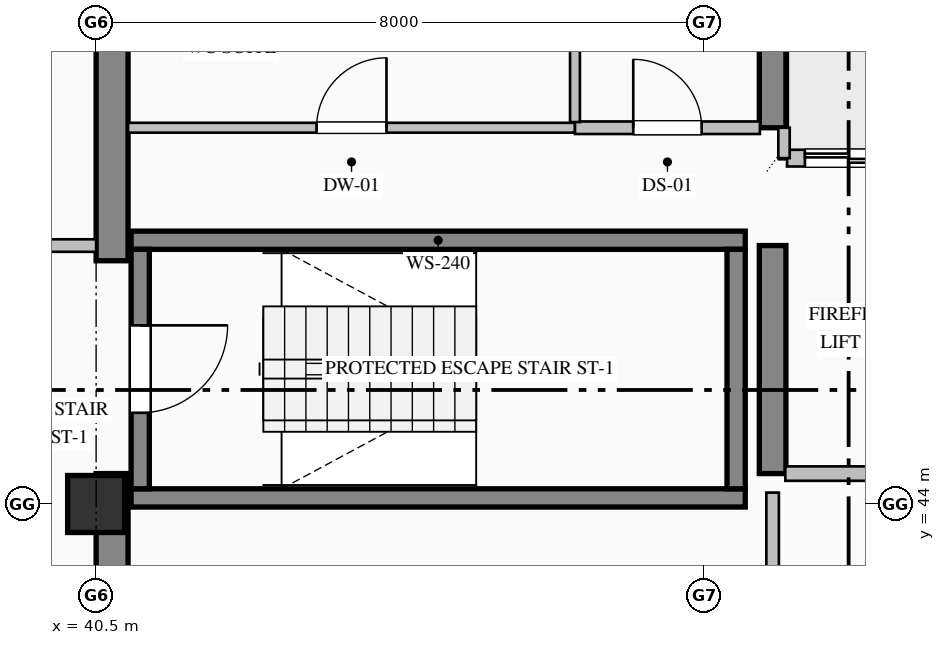
"""IFC4 building model, lengths in metres.
Left out: names, types, materials, properties, quantities, classifications, styles, units other than length and angle.
Written with IfcOpenShell. Run it as: python <this file> out.ifc"""

import sys

from ifc_helpers import new_model, si_unit, direction, frame, frame_2d, origin, origin_2d, place, context, subcontext, project, spatial, rectangle, extrude, element, fill, save


model = new_model("IFC4")
c1 = context("Model", 3, precision=1e-05, world=origin(), true_north=direction((0.0, 1.0)))
c2 = subcontext(c1, "Body", "Model", "MODEL_VIEW")
j1 = project(units=[si_unit("LENGTHUNIT", "METRE"), si_unit("PLANEANGLEUNIT", "RADIAN")], contexts=[c1])
p1 = place(None, origin())
s1 = spatial("IfcSite", under=j1, at=p1, CompositionType="ELEMENT")
p2 = place(p1, origin())
s2 = spatial("IfcBuilding", under=s1, at=p2, CompositionType="ELEMENT")
p3 = place(p2, frame((0.0, 0.0, 291.2)))
s3 = spatial("IfcBuildingStorey", under=s2, at=p3, CompositionType="ELEMENT", Elevation=291.2)
p4 = place(p3, frame((40.71, 36.42, 0.0), z_axis=(0.0, 0.0, 1.0), x_axis=(0.0, 1.0, 0.0)))
e1 = element("IfcWall", 1, at=p4, inside=s3, PredefinedType="SHEAR", context=c2, shape_type="SweptSolid", body=[
    extrude(rectangle(XDim=7.98, YDim=0.42, at=frame_2d((3.99, 0.0))), origin(), (0.0, 0.0, 1.0), 3.785),
])
p5 = place(p3, frame((40.71, 47.2, 0.0), z_axis=(0.0, 0.0, 1.0), x_axis=(0.0, 1.0, 0.0)))
e2 = element("IfcWall", 2, at=p5, inside=s3, PredefinedType="SHEAR", context=c2, shape_type="SweptSolid", body=[
    extrude(rectangle(XDim=4.38, YDim=0.42, at=frame_2d((2.19, 0.0))), origin(), (0.0, 0.0, 1.0), 3.785),
])
p6 = place(p3, frame((49.4, 44.4, 0.0), z_axis=(0.0, 0.0, 1.0), x_axis=(0.0, 1.0, 0.0)))
e3 = element("IfcWall", 3, at=p6, inside=s3, PredefinedType="SHEAR", context=c2, shape_type="SweptSolid", body=[
    extrude(rectangle(XDim=3.0, YDim=0.35, at=frame_2d((1.5, 0.0))), origin(), (0.0, 0.0, 1.0), 3.785),
])
p7 = place(p3, frame((49.4, 48.95, 0.0), z_axis=(0.0, 0.0, 1.0), x_axis=(0.0, 1.0, 0.0)))
e4 = element("IfcWall", 4, at=p7, inside=s3, PredefinedType="SHEAR", context=c2, shape_type="SweptSolid", body=[
    extrude(rectangle(XDim=2.63, YDim=0.35, at=frame_2d((1.315, 0.0))), origin(), (0.0, 0.0, 1.0), 3.785),
])
p8 = place(p3, frame((40.5, 44.0, 0.0), z_axis=(0.0, 0.0, 1.0), x_axis=(1.0, 0.0, 0.0)))
e5 = element("IfcColumn", 5, at=p8, inside=s3, PredefinedType="COLUMN", context=c2, shape_type="SweptSolid", body=[
    extrude(rectangle(XDim=0.75, YDim=0.75, at=origin_2d()), origin(), (0.0, 0.0, 1.0), 4.0),
])
for number, where, z_axis, x_axis in (
    (6, (40.96, 47.47, 0.0), (0.0, 0.0, 1.0), (1.0, 0.0, 0.0)),
    (7, (49.04, 44.08, 0.0), (0.0, 0.0, 1.0), (-1.0, 0.0, 0.0)),
):
    element("IfcWall", number, at=place(p3, frame(where, z_axis=z_axis, x_axis=x_axis)), inside=s3, PredefinedType="SOLIDWALL", context=c2, shape_type="SweptSolid", body=[
        extrude(rectangle(XDim=8.08, YDim=0.24, at=frame_2d((4.04, 0.0))), origin(), (0.0, 0.0, 1.0), 4.0),
    ])
p9 = place(p3, frame((41.08, 47.35, 0.0), z_axis=(0.0, 0.0, 1.0), x_axis=(0.0, -1.0, 0.0)))
e8 = element("IfcWall", 8, at=p9, inside=s3, PredefinedType="SOLIDWALL", context=c2, shape_type="SweptSolid", body=[
    extrude(rectangle(XDim=3.15, YDim=0.24, at=frame_2d((1.575, 0.0))), origin(), (0.0, 0.0, 1.0), 4.0),
])
p10 = place(p9, frame((1.0, 0.0, 0.0)))
e9 = element("IfcOpeningElement", 9, at=p10, cuts=e8, PredefinedType="OPENING", context=c2, shape_type="SweptSolid", body=[
    extrude(rectangle(XDim=1.15, YDim=2.2, at=frame_2d((0.575, 1.1))), frame((0.0, 0.13, 0.0), z_axis=(0.0, -1.0, 0.0), x_axis=(1.0, 0.0, 0.0)), (0.0, 0.0, 1.0), 0.26),
])
p11 = place(p3, frame((48.92, 44.2, 0.0), z_axis=(0.0, 0.0, 1.0), x_axis=(0.0, 1.0, 0.0)))
e10 = element("IfcWall", 10, at=p11, inside=s3, PredefinedType="SOLIDWALL", context=c2, shape_type="SweptSolid", body=[
    extrude(rectangle(XDim=3.15, YDim=0.24, at=frame_2d((1.575, 0.0))), origin(), (0.0, 0.0, 1.0), 4.0),
])
p12 = place(p3, frame((54.71, 48.55, 0.0), z_axis=(0.0, 0.0, 1.0), x_axis=(-1.0, 0.0, 0.0)))
e11 = element("IfcWall", 11, at=p12, inside=s3, PredefinedType="PARTITIONING", context=c2, shape_type="SweptSolid", body=[
    extrude(rectangle(XDim=5.12, YDim=0.22, at=frame_2d((2.56, 0.0))), origin(), (0.0, 0.0, 1.0), 3.785),
])
p13 = place(p12, frame((3.735, 0.0, 0.0)))
e12 = element("IfcOpeningElement", 12, at=p13, cuts=e11, PredefinedType="OPENING", context=c2, shape_type="SweptSolid", body=[
    extrude(rectangle(XDim=1.15, YDim=2.2, at=frame_2d((0.575, 1.1))), frame((0.0, 0.12, 0.0), z_axis=(0.0, -1.0, 0.0), x_axis=(1.0, 0.0, 0.0)), (0.0, 0.0, 1.0), 0.24),
])
p14 = place(p12, frame((0.935, 0.0, 0.0)))
e13 = element("IfcOpeningElement", 13, at=p14, cuts=e11, PredefinedType="OPENING", context=c2, shape_type="SweptSolid", body=[
    extrude(rectangle(XDim=1.15, YDim=2.2, at=frame_2d((0.575, 1.1))), frame((0.0, 0.12, 0.0), z_axis=(0.0, -1.0, 0.0), x_axis=(1.0, 0.0, 0.0)), (0.0, 0.0, 1.0), 0.24),
])
p15 = place(p3, frame((49.55, 48.55, 0.0), z_axis=(0.0, 0.0, 1.0), x_axis=(0.0, 1.0, 0.0)))
e14 = element("IfcWall", 14, at=p15, inside=s3, PredefinedType="PARTITIONING", context=c2, shape_type="SweptSolid", body=[
    extrude(rectangle(XDim=0.4, YDim=0.15, at=frame_2d((0.2, 0.0))), origin(), (0.0, 0.0, 1.0), 3.785),
])
p16 = place(p3, frame((37.8, 47.4, 0.0), z_axis=(0.0, 0.0, 1.0), x_axis=(1.0, 0.0, 0.0)))
e15 = element("IfcWall", 15, at=p16, inside=s3, PredefinedType="PARTITIONING", context=c2, shape_type="SweptSolid", body=[
    extrude(rectangle(XDim=2.7, YDim=0.165, at=frame_2d((1.35, 0.0))), origin(), (0.0, 0.0, 1.0), 3.785),
])
p17 = place(p16, frame((0.825, 0.0, 0.0)))
e16 = element("IfcOpeningElement", 16, at=p17, cuts=e15, PredefinedType="OPENING", context=c2, shape_type="SweptSolid", body=[
    extrude(rectangle(XDim=1.05, YDim=2.15, at=frame_2d((0.525, 1.075))), frame((0.0, 0.093, 0.0), z_axis=(0.0, -1.0, 0.0), x_axis=(1.0, 0.0, 0.0)), (0.0, 0.0, 1.0), 0.185),
])
p18 = place(p3, frame((40.92, 48.95, 0.0), z_axis=(0.0, 0.0, 1.0), x_axis=(1.0, 0.0, 0.0)))
e17 = element("IfcWall", 17, at=p18, inside=s3, PredefinedType="PARTITIONING", context=c2, shape_type="SweptSolid", body=[
    extrude(rectangle(XDim=5.88, YDim=0.13, at=frame_2d((2.94, 0.0))), origin(), (0.0, 0.0, 1.0), 3.785),
])
p19 = place(p18, frame((2.48, 0.0, 0.0)))
e18 = element("IfcOpeningElement", 18, at=p19, cuts=e17, PredefinedType="OPENING", context=c2, shape_type="SweptSolid", body=[
    extrude(rectangle(XDim=0.92, YDim=2.15, at=frame_2d((0.46, 1.075))), frame((0.0, 0.075, 0.0), z_axis=(0.0, -1.0, 0.0), x_axis=(1.0, 0.0, 0.0)), (0.0, 0.0, 1.0), 0.15),
])
p20 = place(p3, frame((46.8, 48.95, 0.0), z_axis=(0.0, 0.0, 1.0), x_axis=(1.0, 0.0, 0.0)))
e19 = element("IfcWall", 19, at=p20, inside=s3, PredefinedType="PARTITIONING", context=c2, shape_type="SweptSolid", body=[
    extrude(rectangle(XDim=2.433, YDim=0.165, at=frame_2d((1.216, 0.0))), origin(), (0.0, 0.0, 1.0), 3.785),
])
p21 = place(p20, frame((0.767, 0.0, 0.0)))
e20 = element("IfcOpeningElement", 20, at=p21, cuts=e19, PredefinedType="OPENING", context=c2, shape_type="SweptSolid", body=[
    extrude(rectangle(XDim=0.9, YDim=2.15, at=frame_2d((0.45, 1.075))), frame((0.0, 0.093, 0.0), z_axis=(0.0, -1.0, 0.0), x_axis=(1.0, 0.0, 0.0)), (0.0, 0.0, 1.0), 0.185),
])
p22 = place(p3, frame((54.733, 44.4, 0.0), z_axis=(0.0, 0.0, 1.0), x_axis=(-1.0, 0.0, 0.0)))
e21 = element("IfcWall", 21, at=p22, inside=s3, PredefinedType="PARTITIONING", context=c2, shape_type="SweptSolid", body=[
    extrude(rectangle(XDim=5.166, YDim=0.19, at=frame_2d((2.583, 0.0))), origin(), (0.0, 0.0, 1.0), 3.785),
])
p23 = place(p22, frame((2.058, 0.0, 0.0)))
e22 = element("IfcOpeningElement", 22, at=p23, cuts=e21, PredefinedType="OPENING", context=c2, shape_type="SweptSolid", body=[
    extrude(rectangle(XDim=1.05, YDim=2.15, at=frame_2d((0.525, 1.075))), frame((0.0, 0.105, 0.0), z_axis=(0.0, -1.0, 0.0), x_axis=(1.0, 0.0, 0.0)), (0.0, 0.0, 1.0), 0.21),
])
p24 = place(p3, frame((49.4, 36.42, 0.0), z_axis=(0.0, 0.0, 1.0), x_axis=(0.0, 1.0, 0.0)))
e23 = element("IfcWall", 23, at=p24, inside=s3, PredefinedType="PARTITIONING", context=c2, shape_type="SweptSolid", body=[
    extrude(rectangle(XDim=7.73, YDim=0.165, at=frame_2d((3.865, 0.0))), origin(), (0.0, 0.0, 1.0), 3.027),
])
p25 = place(p24, frame((3.365, 0.0, 0.0)))
e24 = element("IfcOpeningElement", 24, at=p25, cuts=e23, PredefinedType="OPENING", context=c2, shape_type="SweptSolid", body=[
    extrude(rectangle(XDim=1.0, YDim=2.15, at=frame_2d((0.5, 1.075))), frame((0.0, 0.093, 0.0), z_axis=(0.0, -1.0, 0.0), x_axis=(1.0, 0.0, 0.0)), (0.0, 0.0, 1.0), 0.185),
])
p26 = place(p3, frame((46.8, 51.58, 0.0), z_axis=(0.0, 0.0, 1.0), x_axis=(0.0, -1.0, 0.0)))
e25 = element("IfcWall", 25, at=p26, inside=s3, PredefinedType="PARTITIONING", context=c2, shape_type="SweptSolid", body=[
    extrude(rectangle(XDim=2.556, YDim=0.13, at=frame_2d((1.278, 0.0))), origin(), (0.0, 0.0, 1.0), 3.785),
])
p27 = place(p10, origin())
e26 = element("IfcDoor", 26, at=p27, inside=s3, OperationType="SINGLE_SWING_LEFT", PredefinedType="DOOR", context=c2, shape_type="SweptSolid", body=[
    extrude(rectangle(XDim=1.15, YDim=2.2, at=frame_2d((0.575, 1.1))), frame((0.0, 0.025, 0.0), z_axis=(0.0, -1.0, 0.0), x_axis=(1.0, 0.0, 0.0)), (0.0, 0.0, 1.0), 0.05),
])
fill(e9, e26)
p28 = place(p13, origin())
e27 = element("IfcDoor", 27, at=p28, inside=s3, OperationType="DOUBLE_DOOR_SLIDING", PredefinedType="DOOR", context=c2, shape_type="SweptSolid", body=[
    extrude(rectangle(XDim=1.15, YDim=2.2, at=frame_2d((0.575, 1.1))), frame((0.0, 0.025, 0.0), z_axis=(0.0, -1.0, 0.0), x_axis=(1.0, 0.0, 0.0)), (0.0, 0.0, 1.0), 0.05),
])
fill(e12, e27)
p29 = place(p19, origin())
e28 = element("IfcDoor", 28, at=p29, inside=s3, OperationType="SINGLE_SWING_RIGHT", PredefinedType="DOOR", context=c2, shape_type="SweptSolid", body=[
    extrude(rectangle(XDim=0.92, YDim=2.15, at=frame_2d((0.46, 1.075))), frame((0.0, 0.025, 0.0), z_axis=(0.0, -1.0, 0.0), x_axis=(1.0, 0.0, 0.0)), (0.0, 0.0, 1.0), 0.05),
])
fill(e18, e28)
p30 = place(p21, origin())
e29 = element("IfcDoor", 29, at=p30, inside=s3, OperationType="SINGLE_SWING_LEFT", PredefinedType="DOOR", context=c2, shape_type="SweptSolid", body=[
    extrude(rectangle(XDim=0.9, YDim=2.15, at=frame_2d((0.45, 1.075))), frame((0.0, 0.025, 0.0), z_axis=(0.0, -1.0, 0.0), x_axis=(1.0, 0.0, 0.0)), (0.0, 0.0, 1.0), 0.05),
])
fill(e20, e29)
save(model, sys.argv[1])
